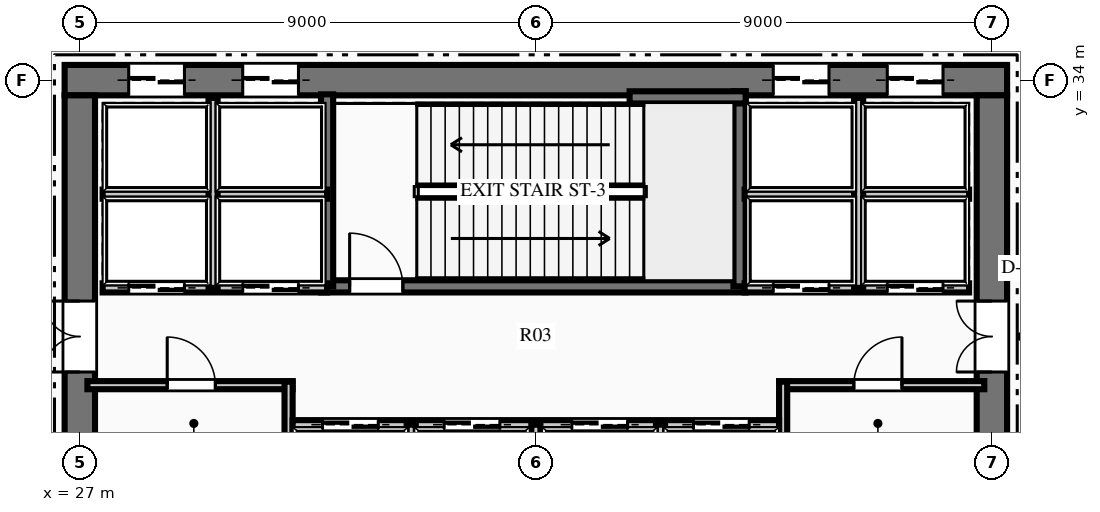
"""IFC4 building model, lengths in metres.
Left out: names, types, materials, properties, quantities, classifications, styles, units other than length and angle.
Written with IfcOpenShell. Run it as: python <this file> out.ifc"""

import sys

from ifc_helpers import new_model, si_unit, direction, frame, frame_2d, origin, place, context, subcontext, project, spatial, rectangle, extrude, element, fill, save


model = new_model("IFC4")
c1 = context("Model", 3, precision=1e-05, world=origin(), true_north=direction((0.0, 1.0)))
c2 = subcontext(c1, "Body", "Model", "MODEL_VIEW")
j1 = project(units=[si_unit("LENGTHUNIT", "METRE"), si_unit("PLANEANGLEUNIT", "RADIAN")], contexts=[c1])
p1 = place(None, origin())
s1 = spatial("IfcSite", under=j1, at=p1, CompositionType="ELEMENT")
p2 = place(p1, origin())
s2 = spatial("IfcBuilding", under=s1, at=p2, CompositionType="ELEMENT")
p3 = place(p2, frame((0.0, 0.0, 22.2)))
s3 = spatial("IfcBuildingStorey", under=s2, at=p3, CompositionType="ELEMENT", Elevation=22.2)
p4 = place(p3, frame((26.7, 34.0, 0.0), z_axis=(0.0, 0.0, 1.0), x_axis=(1.0, 0.0, 0.0)))
e1 = element("IfcWall", 1, at=p4, inside=s3, PredefinedType="SHEAR", context=c2, shape_type="SweptSolid", body=[
    extrude(rectangle(XDim=18.6, YDim=0.6, at=frame_2d((9.3, 0.0))), origin(), (0.0, 0.0, 1.0), 6.0),
])
p5 = place(p4, frame((1.265, 0.0, 0.0)))
e2 = element("IfcOpeningElement", 2, at=p5, cuts=e1, PredefinedType="OPENING", context=c2, shape_type="SweptSolid", body=[
    extrude(rectangle(XDim=1.1, YDim=2.15, at=frame_2d((0.55, 1.075))), frame((0.0, 0.31, 0.0), z_axis=(0.0, -1.0, 0.0), x_axis=(1.0, 0.0, 0.0)), (0.0, 0.0, 1.0), 0.62),
])
p6 = place(p4, frame((3.515, 0.0, 0.0)))
e3 = element("IfcOpeningElement", 3, at=p6, cuts=e1, PredefinedType="OPENING", context=c2, shape_type="SweptSolid", body=[
    extrude(rectangle(XDim=1.1, YDim=2.15, at=frame_2d((0.55, 1.075))), frame((0.0, 0.31, 0.0), z_axis=(0.0, -1.0, 0.0), x_axis=(1.0, 0.0, 0.0)), (0.0, 0.0, 1.0), 0.62),
])
p7 = place(p4, frame((13.985, 0.0, 0.0)))
e4 = element("IfcOpeningElement", 4, at=p7, cuts=e1, PredefinedType="OPENING", context=c2, shape_type="SweptSolid", body=[
    extrude(rectangle(XDim=1.1, YDim=2.15, at=frame_2d((0.55, 1.075))), frame((0.0, 0.31, 0.0), z_axis=(0.0, -1.0, 0.0), x_axis=(1.0, 0.0, 0.0)), (0.0, 0.0, 1.0), 0.62),
])
p8 = place(p4, frame((16.235, 0.0, 0.0)))
e5 = element("IfcOpeningElement", 5, at=p8, cuts=e1, PredefinedType="OPENING", context=c2, shape_type="SweptSolid", body=[
    extrude(rectangle(XDim=1.1, YDim=2.15, at=frame_2d((0.55, 1.075))), frame((0.0, 0.31, 0.0), z_axis=(0.0, -1.0, 0.0), x_axis=(1.0, 0.0, 0.0)), (0.0, 0.0, 1.0), 0.62),
])
p9 = place(p3, frame((27.0, 18.3, 0.0), z_axis=(0.0, 0.0, 1.0), x_axis=(0.0, 1.0, 0.0)))
e6 = element("IfcWall", 6, at=p9, inside=s3, PredefinedType="SHEAR", context=c2, shape_type="SweptSolid", body=[
    extrude(rectangle(XDim=15.4, YDim=0.6, at=frame_2d((7.7, 0.0))), origin(), (0.0, 0.0, 1.0), 6.0),
])
p10 = place(p9, frame((9.94, 0.0, 0.0)))
e7 = element("IfcOpeningElement", 7, at=p10, cuts=e6, PredefinedType="OPENING", context=c2, shape_type="SweptSolid", body=[
    extrude(rectangle(XDim=1.4, YDim=2.2, at=frame_2d((0.7, 1.1))), frame((0.0, 0.31, 0.0), z_axis=(0.0, -1.0, 0.0), x_axis=(1.0, 0.0, 0.0)), (0.0, 0.0, 1.0), 0.62),
])
p11 = place(p3, frame((45.0, 18.3, 0.0), z_axis=(0.0, 0.0, 1.0), x_axis=(0.0, 1.0, 0.0)))
e8 = element("IfcWall", 8, at=p11, inside=s3, PredefinedType="SHEAR", context=c2, shape_type="SweptSolid", body=[
    extrude(rectangle(XDim=15.4, YDim=0.6, at=frame_2d((7.7, 0.0))), origin(), (0.0, 0.0, 1.0), 6.0),
])
p12 = place(p11, frame((9.94, 0.0, 0.0)))
e9 = element("IfcOpeningElement", 9, at=p12, cuts=e8, PredefinedType="OPENING", context=c2, shape_type="SweptSolid", body=[
    extrude(rectangle(XDim=1.4, YDim=2.2, at=frame_2d((0.7, 1.1))), frame((0.0, 0.31, 0.0), z_axis=(0.0, -1.0, 0.0), x_axis=(1.0, 0.0, 0.0)), (0.0, 0.0, 1.0), 0.62),
])
p13 = place(p3, frame((31.76, 29.93, 0.0), z_axis=(0.0, 0.0, 1.0), x_axis=(1.0, 0.0, 0.0)))
e10 = element("IfcWall", 10, at=p13, inside=s3, PredefinedType="SHEAR", context=c2, shape_type="SweptSolid", body=[
    extrude(rectangle(XDim=8.38, YDim=0.24, at=frame_2d((4.19, 0.0))), origin(), (0.0, 0.0, 1.0), 6.0),
])
p14 = place(p13, frame((0.565, 0.0, 0.0)))
e11 = element("IfcOpeningElement", 11, at=p14, cuts=e10, PredefinedType="OPENING", context=c2, shape_type="SweptSolid", body=[
    extrude(rectangle(XDim=1.05, YDim=2.15, at=frame_2d((0.525, 1.075))), frame((0.0, 0.13, 0.0), z_axis=(0.0, -1.0, 0.0), x_axis=(1.0, 0.0, 0.0)), (0.0, 0.0, 1.0), 0.26),
])
p15 = place(p3, frame((31.88, 29.93, 0.0), z_axis=(0.0, 0.0, 1.0), x_axis=(0.0, 1.0, 0.0)))
e12 = element("IfcWall", 12, at=p15, inside=s3, PredefinedType="SHEAR", context=c2, shape_type="SweptSolid", body=[
    extrude(rectangle(XDim=3.79, YDim=0.24, at=frame_2d((1.895, 0.0))), origin(), (0.0, 0.0, 1.0), 6.0),
])
p16 = place(p3, frame((40.02, 29.93, 0.0), z_axis=(0.0, 0.0, 1.0), x_axis=(0.0, 1.0, 0.0)))
e13 = element("IfcWall", 13, at=p16, inside=s3, PredefinedType="SHEAR", context=c2, shape_type="SweptSolid", body=[
    extrude(rectangle(XDim=3.85, YDim=0.24, at=frame_2d((1.925, 0.0))), origin(), (0.0, 0.0, 1.0), 6.0),
])
p17 = place(p3, frame((37.85, 33.66, 0.0), z_axis=(0.0, 0.0, 1.0), x_axis=(1.0, 0.0, 0.0)))
e14 = element("IfcWall", 14, at=p17, inside=s3, PredefinedType="SHEAR", context=c2, shape_type="SweptSolid", body=[
    extrude(rectangle(XDim=2.29, YDim=0.24, at=frame_2d((1.145, 0.0))), origin(), (0.0, 0.0, 1.0), 6.0),
])
p18 = place(p3, frame((27.15, 27.98, 0.0), z_axis=(0.0, 0.0, 1.0), x_axis=(1.0, 0.0, 0.0)))
e15 = element("IfcWall", 15, at=p18, inside=s3, PredefinedType="PARTITIONING", context=c2, shape_type="SweptSolid", body=[
    extrude(rectangle(XDim=4.05, YDim=0.16, at=frame_2d((2.025, 0.0))), origin(), (0.0, 0.0, 1.0), 5.59),
])
p19 = place(p18, frame((1.575, 0.0, 0.0)))
e16 = element("IfcOpeningElement", 16, at=p19, cuts=e15, PredefinedType="OPENING", context=c2, shape_type="SweptSolid", body=[
    extrude(rectangle(XDim=0.95, YDim=2.15, at=frame_2d((0.475, 1.075))), frame((0.0, 0.09, 0.0), z_axis=(0.0, -1.0, 0.0), x_axis=(1.0, 0.0, 0.0)), (0.0, 0.0, 1.0), 0.18),
])
p20 = place(p3, frame((31.12, 26.54, 0.0), z_axis=(0.0, 0.0, 1.0), x_axis=(0.0, 1.0, 0.0)))
e17 = element("IfcWall", 17, at=p20, inside=s3, PredefinedType="PARTITIONING", context=c2, shape_type="SweptSolid", body=[
    extrude(rectangle(XDim=1.51, YDim=0.16, at=frame_2d((0.755, 0.0))), origin(), (0.0, 0.0, 1.0), 5.59),
])
p21 = place(p3, frame((40.8, 27.98, 0.0), z_axis=(0.0, 0.0, 1.0), x_axis=(1.0, 0.0, 0.0)))
e18 = element("IfcWall", 18, at=p21, inside=s3, PredefinedType="PARTITIONING", context=c2, shape_type="SweptSolid", body=[
    extrude(rectangle(XDim=4.05, YDim=0.16, at=frame_2d((2.025, 0.0))), origin(), (0.0, 0.0, 1.0), 5.59),
])
p22 = place(p21, frame((1.475, 0.0, 0.0)))
e19 = element("IfcOpeningElement", 19, at=p22, cuts=e18, PredefinedType="OPENING", context=c2, shape_type="SweptSolid", body=[
    extrude(rectangle(XDim=0.95, YDim=2.15, at=frame_2d((0.475, 1.075))), frame((0.0, 0.09, 0.0), z_axis=(0.0, -1.0, 0.0), x_axis=(1.0, 0.0, 0.0)), (0.0, 0.0, 1.0), 0.18),
])
p23 = place(p3, frame((40.88, 26.54, 0.0), z_axis=(0.0, 0.0, 1.0), x_axis=(0.0, 1.0, 0.0)))
e20 = element("IfcWall", 20, at=p23, inside=s3, PredefinedType="PARTITIONING", context=c2, shape_type="SweptSolid", body=[
    extrude(rectangle(XDim=1.51, YDim=0.16, at=frame_2d((0.755, 0.0))), origin(), (0.0, 0.0, 1.0), 5.59),
])
p24 = place(p3, frame((27.45, 29.9, 0.0), z_axis=(0.0, 0.0, 1.0), x_axis=(1.0, 0.0, 0.0)))
e21 = element("IfcWall", 21, at=p24, inside=s3, PredefinedType="PARTITIONING", context=c2, shape_type="SweptSolid", body=[
    extrude(rectangle(XDim=4.43, YDim=0.18, at=frame_2d((2.215, 0.0))), origin(), (0.0, 0.0, 1.0), 5.59),
])
p25 = place(p24, frame((0.515, 0.0, 0.0)))
e22 = element("IfcOpeningElement", 22, at=p25, cuts=e21, PredefinedType="OPENING", context=c2, shape_type="SweptSolid", body=[
    extrude(rectangle(XDim=1.1, YDim=2.15, at=frame_2d((0.55, 1.075))), frame((0.0, 0.1, 0.0), z_axis=(0.0, -1.0, 0.0), x_axis=(1.0, 0.0, 0.0)), (0.0, 0.0, 1.0), 0.2),
])
p26 = place(p24, frame((2.765, 0.0, 0.0)))
e23 = element("IfcOpeningElement", 23, at=p26, cuts=e21, PredefinedType="OPENING", context=c2, shape_type="SweptSolid", body=[
    extrude(rectangle(XDim=1.1, YDim=2.15, at=frame_2d((0.55, 1.075))), frame((0.0, 0.1, 0.0), z_axis=(0.0, -1.0, 0.0), x_axis=(1.0, 0.0, 0.0)), (0.0, 0.0, 1.0), 0.2),
])
p27 = place(p3, frame((27.45, 31.75, 0.0), z_axis=(0.0, 0.0, 1.0), x_axis=(1.0, 0.0, 0.0)))
e24 = element("IfcWall", 24, at=p27, inside=s3, PredefinedType="PARTITIONING", context=c2, shape_type="SweptSolid", body=[
    extrude(rectangle(XDim=4.43, YDim=0.18, at=frame_2d((2.215, 0.0))), origin(), (0.0, 0.0, 1.0), 5.59),
])
p28 = place(p3, frame((29.63, 29.9, 0.0), z_axis=(0.0, 0.0, 1.0), x_axis=(0.0, 1.0, 0.0)))
e25 = element("IfcWall", 25, at=p28, inside=s3, PredefinedType="PARTITIONING", context=c2, shape_type="SweptSolid", body=[
    extrude(rectangle(XDim=3.75, YDim=0.18, at=frame_2d((1.875, 0.0))), origin(), (0.0, 0.0, 1.0), 5.59),
])
p29 = place(p3, frame((40.12, 29.9, 0.0), z_axis=(0.0, 0.0, 1.0), x_axis=(1.0, 0.0, 0.0)))
e26 = element("IfcWall", 26, at=p29, inside=s3, PredefinedType="PARTITIONING", context=c2, shape_type="SweptSolid", body=[
    extrude(rectangle(XDim=4.43, YDim=0.18, at=frame_2d((2.215, 0.0))), origin(), (0.0, 0.0, 1.0), 5.59),
])
p30 = place(p29, frame((0.565, 0.0, 0.0)))
e27 = element("IfcOpeningElement", 27, at=p30, cuts=e26, PredefinedType="OPENING", context=c2, shape_type="SweptSolid", body=[
    extrude(rectangle(XDim=1.1, YDim=2.15, at=frame_2d((0.55, 1.075))), frame((0.0, 0.1, 0.0), z_axis=(0.0, -1.0, 0.0), x_axis=(1.0, 0.0, 0.0)), (0.0, 0.0, 1.0), 0.2),
])
p31 = place(p29, frame((2.815, 0.0, 0.0)))
e28 = element("IfcOpeningElement", 28, at=p31, cuts=e26, PredefinedType="OPENING", context=c2, shape_type="SweptSolid", body=[
    extrude(rectangle(XDim=1.1, YDim=2.15, at=frame_2d((0.55, 1.075))), frame((0.0, 0.1, 0.0), z_axis=(0.0, -1.0, 0.0), x_axis=(1.0, 0.0, 0.0)), (0.0, 0.0, 1.0), 0.2),
])
p32 = place(p3, frame((40.12, 31.75, 0.0), z_axis=(0.0, 0.0, 1.0), x_axis=(1.0, 0.0, 0.0)))
e29 = element("IfcWall", 29, at=p32, inside=s3, PredefinedType="PARTITIONING", context=c2, shape_type="SweptSolid", body=[
    extrude(rectangle(XDim=4.43, YDim=0.18, at=frame_2d((2.215, 0.0))), origin(), (0.0, 0.0, 1.0), 5.59),
])
p33 = place(p3, frame((42.37, 29.9, 0.0), z_axis=(0.0, 0.0, 1.0), x_axis=(0.0, 1.0, 0.0)))
e30 = element("IfcWall", 30, at=p33, inside=s3, PredefinedType="PARTITIONING", context=c2, shape_type="SweptSolid", body=[
    extrude(rectangle(XDim=3.75, YDim=0.18, at=frame_2d((1.875, 0.0))), origin(), (0.0, 0.0, 1.0), 5.59),
])
p34 = place(p3, frame((31.2, 27.2, 0.0), z_axis=(0.0, 0.0, 1.0), x_axis=(1.0, 0.0, 0.0)))
e31 = element("IfcWall", 31, at=p34, inside=s3, PredefinedType="PARTITIONING", context=c2, shape_type="SweptSolid", body=[
    extrude(rectangle(XDim=9.6, YDim=0.18, at=frame_2d((4.8, 0.0))), origin(), (0.0, 0.0, 1.0), 5.59),
])
p35 = place(p34, frame((0.59, 0.0, 0.0)))
e32 = element("IfcOpeningElement", 32, at=p35, cuts=e31, PredefinedType="OPENING", context=c2, shape_type="SweptSolid", body=[
    extrude(rectangle(XDim=1.1, YDim=2.15, at=frame_2d((0.55, 1.075))), frame((0.0, 0.1, 0.0), z_axis=(0.0, -1.0, 0.0), x_axis=(1.0, 0.0, 0.0)), (0.0, 0.0, 1.0), 0.2),
])
p36 = place(p34, frame((2.99, 0.0, 0.0)))
e33 = element("IfcOpeningElement", 33, at=p36, cuts=e31, PredefinedType="OPENING", context=c2, shape_type="SweptSolid", body=[
    extrude(rectangle(XDim=1.1, YDim=2.15, at=frame_2d((0.55, 1.075))), frame((0.0, 0.1, 0.0), z_axis=(0.0, -1.0, 0.0), x_axis=(1.0, 0.0, 0.0)), (0.0, 0.0, 1.0), 0.2),
])
p37 = place(p34, frame((5.51, 0.0, 0.0)))
e34 = element("IfcOpeningElement", 34, at=p37, cuts=e31, PredefinedType="OPENING", context=c2, shape_type="SweptSolid", body=[
    extrude(rectangle(XDim=1.1, YDim=2.15, at=frame_2d((0.55, 1.075))), frame((0.0, 0.1, 0.0), z_axis=(0.0, -1.0, 0.0), x_axis=(1.0, 0.0, 0.0)), (0.0, 0.0, 1.0), 0.2),
])
p38 = place(p34, frame((7.91, 0.0, 0.0)))
e35 = element("IfcOpeningElement", 35, at=p38, cuts=e31, PredefinedType="OPENING", context=c2, shape_type="SweptSolid", body=[
    extrude(rectangle(XDim=1.1, YDim=2.15, at=frame_2d((0.55, 1.075))), frame((0.0, 0.1, 0.0), z_axis=(0.0, -1.0, 0.0), x_axis=(1.0, 0.0, 0.0)), (0.0, 0.0, 1.0), 0.2),
])
for number, where, z_axis, x_axis in (
    (36, (33.54, 25.3, 0.0), (0.0, 0.0, 1.0), (0.0, 1.0, 0.0)),
    (37, (36.0, 25.3, 0.0), (0.0, 0.0, 1.0), (0.0, 1.0, 0.0)),
    (38, (38.46, 25.3, 0.0), (0.0, 0.0, 1.0), (0.0, 1.0, 0.0)),
):
    element("IfcWall", number, at=place(p3, frame(where, z_axis=z_axis, x_axis=x_axis)), inside=s3, PredefinedType="PARTITIONING", context=c2, shape_type="SweptSolid", body=[
        extrude(rectangle(XDim=1.9, YDim=0.18, at=frame_2d((0.95, 0.0))), origin(), (0.0, 0.0, 1.0), 5.59),
    ])
p39 = place(p19, origin())
e39 = element("IfcDoor", 39, at=p39, inside=s3, OperationType="SINGLE_SWING_LEFT", PredefinedType="DOOR", context=c2, shape_type="SweptSolid", body=[
    extrude(rectangle(XDim=0.95, YDim=2.15, at=frame_2d((0.475, 1.075))), frame((0.0, 0.025, 0.0), z_axis=(0.0, -1.0, 0.0), x_axis=(1.0, 0.0, 0.0)), (0.0, 0.0, 1.0), 0.05),
])
fill(e16, e39)
p40 = place(p22, origin())
e40 = element("IfcDoor", 40, at=p40, inside=s3, OperationType="SINGLE_SWING_RIGHT", PredefinedType="DOOR", context=c2, shape_type="SweptSolid", body=[
    extrude(rectangle(XDim=0.95, YDim=2.15, at=frame_2d((0.475, 1.075))), frame((0.0, 0.025, 0.0), z_axis=(0.0, -1.0, 0.0), x_axis=(1.0, 0.0, 0.0)), (0.0, 0.0, 1.0), 0.05),
])
fill(e19, e40)
p41 = place(p14, origin())
e41 = element("IfcDoor", 41, at=p41, inside=s3, OperationType="SINGLE_SWING_LEFT", PredefinedType="DOOR", context=c2, shape_type="SweptSolid", body=[
    extrude(rectangle(XDim=1.05, YDim=2.15, at=frame_2d((0.525, 1.075))), frame((0.0, 0.025, 0.0), z_axis=(0.0, -1.0, 0.0), x_axis=(1.0, 0.0, 0.0)), (0.0, 0.0, 1.0), 0.05),
])
fill(e11, e41)
p42 = place(p10, origin())
e42 = element("IfcDoor", 42, at=p42, inside=s3, OperationType="DOUBLE_DOOR_SINGLE_SWING", PredefinedType="DOOR", context=c2, shape_type="SweptSolid", body=[
    extrude(rectangle(XDim=1.4, YDim=2.2, at=frame_2d((0.7, 1.1))), frame((0.0, 0.025, 0.0), z_axis=(0.0, -1.0, 0.0), x_axis=(1.0, 0.0, 0.0)), (0.0, 0.0, 1.0), 0.05),
])
fill(e7, e42)
p43 = place(p12, origin())
e43 = element("IfcDoor", 43, at=p43, inside=s3, OperationType="DOUBLE_DOOR_SINGLE_SWING", PredefinedType="DOOR", context=c2, shape_type="SweptSolid", body=[
    extrude(rectangle(XDim=1.4, YDim=2.2, at=frame_2d((0.7, 1.1))), frame((0.0, 0.025, 0.0), z_axis=(0.0, -1.0, 0.0), x_axis=(1.0, 0.0, 0.0)), (0.0, 0.0, 1.0), 0.05),
])
fill(e9, e43)
p44 = place(p25, origin())
e44 = element("IfcDoor", 44, at=p44, inside=s3, OperationType="SLIDING_TO_LEFT", PredefinedType="DOOR", context=c2, shape_type="SweptSolid", body=[
    extrude(rectangle(XDim=1.1, YDim=2.15, at=frame_2d((0.55, 1.075))), frame((0.0, 0.025, 0.0), z_axis=(0.0, -1.0, 0.0), x_axis=(1.0, 0.0, 0.0)), (0.0, 0.0, 1.0), 0.05),
])
fill(e22, e44)
p45 = place(p26, origin())
e45 = element("IfcDoor", 45, at=p45, inside=s3, OperationType="SLIDING_TO_LEFT", PredefinedType="DOOR", context=c2, shape_type="SweptSolid", body=[
    extrude(rectangle(XDim=1.1, YDim=2.15, at=frame_2d((0.55, 1.075))), frame((0.0, 0.025, 0.0), z_axis=(0.0, -1.0, 0.0), x_axis=(1.0, 0.0, 0.0)), (0.0, 0.0, 1.0), 0.05),
])
fill(e23, e45)
p46 = place(p5, origin())
e46 = element("IfcDoor", 46, at=p46, inside=s3, OperationType="SLIDING_TO_LEFT", PredefinedType="DOOR", context=c2, shape_type="SweptSolid", body=[
    extrude(rectangle(XDim=1.1, YDim=2.15, at=frame_2d((0.55, 1.075))), frame((0.0, 0.025, 0.0), z_axis=(0.0, -1.0, 0.0), x_axis=(1.0, 0.0, 0.0)), (0.0, 0.0, 1.0), 0.05),
])
fill(e2, e46)
p47 = place(p6, origin())
e47 = element("IfcDoor", 47, at=p47, inside=s3, OperationType="SLIDING_TO_LEFT", PredefinedType="DOOR", context=c2, shape_type="SweptSolid", body=[
    extrude(rectangle(XDim=1.1, YDim=2.15, at=frame_2d((0.55, 1.075))), frame((0.0, 0.025, 0.0), z_axis=(0.0, -1.0, 0.0), x_axis=(1.0, 0.0, 0.0)), (0.0, 0.0, 1.0), 0.05),
])
fill(e3, e47)
p48 = place(p30, origin())
e48 = element("IfcDoor", 48, at=p48, inside=s3, OperationType="SLIDING_TO_LEFT", PredefinedType="DOOR", context=c2, shape_type="SweptSolid", body=[
    extrude(rectangle(XDim=1.1, YDim=2.15, at=frame_2d((0.55, 1.075))), frame((0.0, 0.025, 0.0), z_axis=(0.0, -1.0, 0.0), x_axis=(1.0, 0.0, 0.0)), (0.0, 0.0, 1.0), 0.05),
])
fill(e27, e48)
p49 = place(p31, origin())
e49 = element("IfcDoor", 49, at=p49, inside=s3, OperationType="SLIDING_TO_LEFT", PredefinedType="DOOR", context=c2, shape_type="SweptSolid", body=[
    extrude(rectangle(XDim=1.1, YDim=2.15, at=frame_2d((0.55, 1.075))), frame((0.0, 0.025, 0.0), z_axis=(0.0, -1.0, 0.0), x_axis=(1.0, 0.0, 0.0)), (0.0, 0.0, 1.0), 0.05),
])
fill(e28, e49)
p50 = place(p7, origin())
e50 = element("IfcDoor", 50, at=p50, inside=s3, OperationType="SLIDING_TO_LEFT", PredefinedType="DOOR", context=c2, shape_type="SweptSolid", body=[
    extrude(rectangle(XDim=1.1, YDim=2.15, at=frame_2d((0.55, 1.075))), frame((0.0, 0.025, 0.0), z_axis=(0.0, -1.0, 0.0), x_axis=(1.0, 0.0, 0.0)), (0.0, 0.0, 1.0), 0.05),
])
fill(e4, e50)
p51 = place(p8, origin())
e51 = element("IfcDoor", 51, at=p51, inside=s3, OperationType="SLIDING_TO_LEFT", PredefinedType="DOOR", context=c2, shape_type="SweptSolid", body=[
    extrude(rectangle(XDim=1.1, YDim=2.15, at=frame_2d((0.55, 1.075))), frame((0.0, 0.025, 0.0), z_axis=(0.0, -1.0, 0.0), x_axis=(1.0, 0.0, 0.0)), (0.0, 0.0, 1.0), 0.05),
])
fill(e5, e51)
p52 = place(p35, origin())
e52 = element("IfcDoor", 52, at=p52, inside=s3, OperationType="SLIDING_TO_LEFT", PredefinedType="DOOR", context=c2, shape_type="SweptSolid", body=[
    extrude(rectangle(XDim=1.1, YDim=2.15, at=frame_2d((0.55, 1.075))), frame((0.0, 0.025, 0.0), z_axis=(0.0, -1.0, 0.0), x_axis=(1.0, 0.0, 0.0)), (0.0, 0.0, 1.0), 0.05),
])
fill(e32, e52)
p53 = place(p36, origin())
e53 = element("IfcDoor", 53, at=p53, inside=s3, OperationType="SLIDING_TO_LEFT", PredefinedType="DOOR", context=c2, shape_type="SweptSolid", body=[
    extrude(rectangle(XDim=1.1, YDim=2.15, at=frame_2d((0.55, 1.075))), frame((0.0, 0.025, 0.0), z_axis=(0.0, -1.0, 0.0), x_axis=(1.0, 0.0, 0.0)), (0.0, 0.0, 1.0), 0.05),
])
fill(e33, e53)
p54 = place(p37, origin())
e54 = element("IfcDoor", 54, at=p54, inside=s3, OperationType="SLIDING_TO_LEFT", PredefinedType="DOOR", context=c2, shape_type="SweptSolid", body=[
    extrude(rectangle(XDim=1.1, YDim=2.15, at=frame_2d((0.55, 1.075))), frame((0.0, 0.025, 0.0), z_axis=(0.0, -1.0, 0.0), x_axis=(1.0, 0.0, 0.0)), (0.0, 0.0, 1.0), 0.05),
])
fill(e34, e54)
p55 = place(p38, origin())
e55 = element("IfcDoor", 55, at=p55, inside=s3, OperationType="SLIDING_TO_LEFT", PredefinedType="DOOR", context=c2, shape_type="SweptSolid", body=[
    extrude(rectangle(XDim=1.1, YDim=2.15, at=frame_2d((0.55, 1.075))), frame((0.0, 0.025, 0.0), z_axis=(0.0, -1.0, 0.0), x_axis=(1.0, 0.0, 0.0)), (0.0, 0.0, 1.0), 0.05),
])
fill(e35, e55)
save(model, sys.argv[1])
